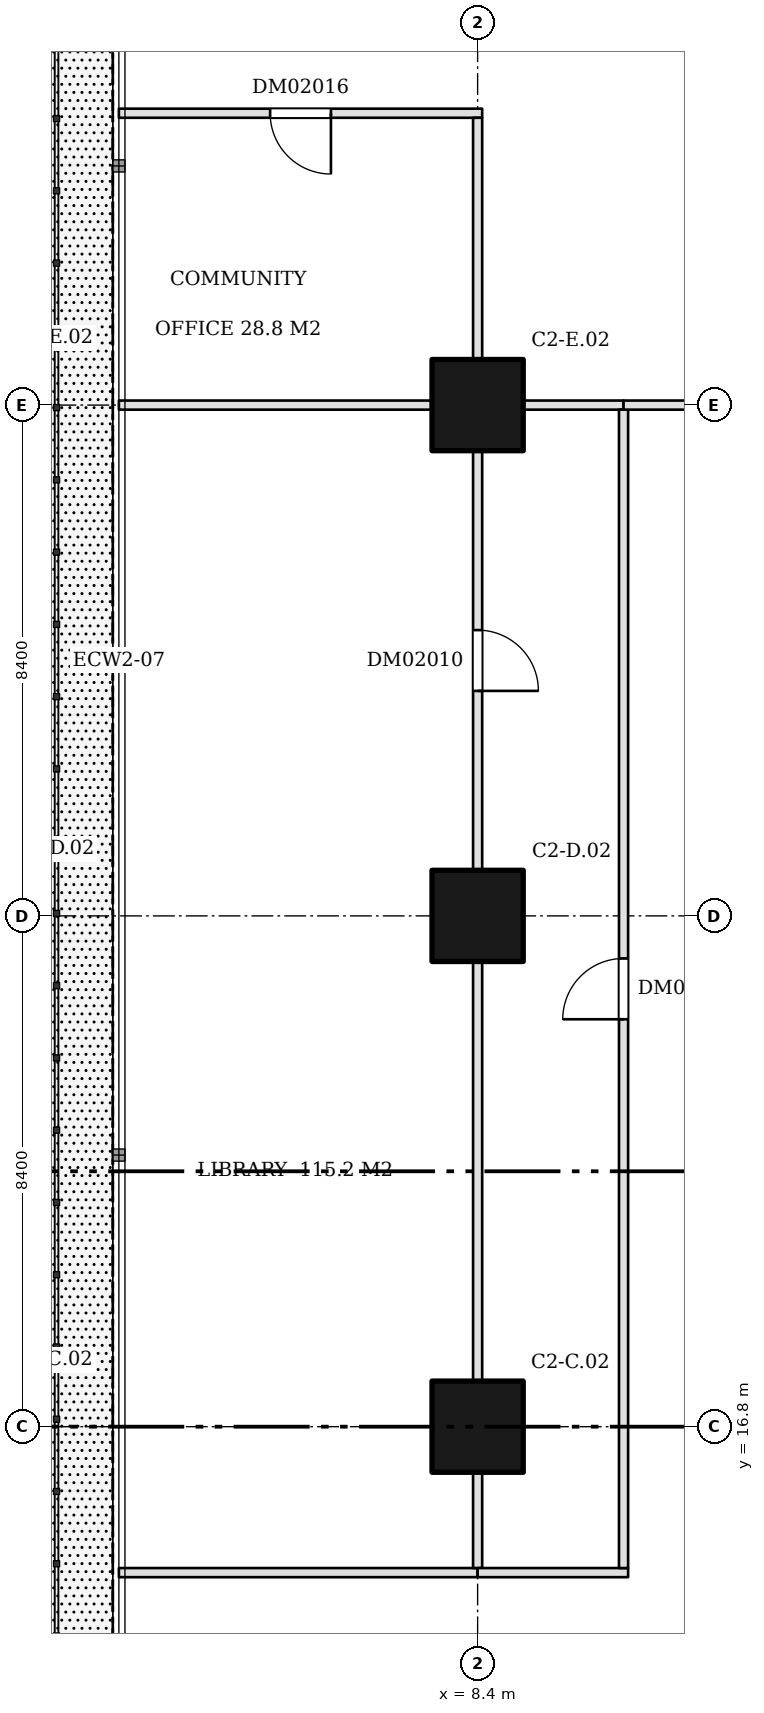
"""IFC4 building model, lengths in metres.
Left out: names, types, materials, properties, quantities, classifications, styles, units other than length and angle.
Written with IfcOpenShell. Run it as: python <this file> out.ifc"""

import sys

from ifc_helpers import new_model, si_unit, direction, frame, frame_2d, origin, origin_2d, place, context, subcontext, project, spatial, rectangle, extrude, element, fill, save


model = new_model("IFC4")
c1 = context("Model", 3, precision=1e-05, world=origin(), true_north=direction((0.0, 1.0)))
c2 = subcontext(c1, "Body", "Model", "MODEL_VIEW")
j1 = project(units=[si_unit("LENGTHUNIT", "METRE"), si_unit("PLANEANGLEUNIT", "RADIAN")], contexts=[c1])
p1 = place(None, origin())
s1 = spatial("IfcSite", under=j1, at=p1, CompositionType="ELEMENT")
p2 = place(p1, origin())
s2 = spatial("IfcBuilding", under=s1, at=p2, CompositionType="ELEMENT")
p3 = place(p2, frame((0.0, 0.0, 14.4)))
s3 = spatial("IfcBuildingStorey", under=s2, at=p3, CompositionType="ELEMENT", Elevation=14.4)
for number, where, z_axis, x_axis in (
    (1, (8.4, 16.8, 0.0), (0.0, 0.0, 1.0), (1.0, 0.0, 0.0)),
    (2, (8.4, 25.2, 0.0), (0.0, 0.0, 1.0), (1.0, 0.0, 0.0)),
    (3, (8.4, 33.6, 0.0), (0.0, 0.0, 1.0), (1.0, 0.0, 0.0)),
):
    element("IfcColumn", number, at=place(p3, frame(where, z_axis=z_axis, x_axis=x_axis)), inside=s3, PredefinedType="COLUMN", context=c2, shape_type="SweptSolid", body=[
        extrude(rectangle(XDim=1.5, YDim=1.5, at=origin_2d()), origin(), (0.0, 0.0, 1.0), 5.1),
    ])
p4 = place(p3, frame((2.5, 14.4, 0.0), z_axis=(0.0, 0.0, 1.0), x_axis=(1.0, 0.0, 0.0)))
e4 = element("IfcWall", 4, at=p4, inside=s3, PredefinedType="PARTITIONING", context=c2, shape_type="SweptSolid", body=[
    extrude(rectangle(XDim=5.9, YDim=0.15, at=frame_2d((2.95, 0.0))), origin(), (0.0, 0.0, 1.0), 5.1),
])
p5 = place(p3, frame((2.5, 33.6, 0.0), z_axis=(0.0, 0.0, 1.0), x_axis=(1.0, 0.0, 0.0)))
e5 = element("IfcWall", 5, at=p5, inside=s3, PredefinedType="PARTITIONING", context=c2, shape_type="SweptSolid", body=[
    extrude(rectangle(XDim=5.15, YDim=0.15, at=frame_2d((2.575, 0.0))), origin(), (0.0, 0.0, 1.0), 5.1),
])
p6 = place(p3, frame((2.5, 38.4, 0.0), z_axis=(0.0, 0.0, 1.0), x_axis=(1.0, 0.0, 0.0)))
e6 = element("IfcWall", 6, at=p6, inside=s3, PredefinedType="PARTITIONING", context=c2, shape_type="SweptSolid", body=[
    extrude(rectangle(XDim=5.975, YDim=0.15, at=frame_2d((2.988, 0.0))), origin(), (0.0, 0.0, 1.0), 5.1),
])
p7 = place(p6, frame((2.488, 0.0, 0.0)))
e7 = element("IfcOpeningElement", 7, at=p7, cuts=e6, PredefinedType="OPENING", context=c2, shape_type="SweptSolid", body=[
    extrude(rectangle(XDim=1.0, YDim=2.1, at=frame_2d((0.5, 1.05))), frame((0.0, 0.085, 0.0), z_axis=(0.0, -1.0, 0.0), x_axis=(1.0, 0.0, 0.0)), (0.0, 0.0, 1.0), 0.17),
])
p8 = place(p3, frame((8.4, 14.475, 0.0), z_axis=(0.0, 0.0, 1.0), x_axis=(0.0, 1.0, 0.0)))
e8 = element("IfcWall", 8, at=p8, inside=s3, PredefinedType="PARTITIONING", context=c2, shape_type="SweptSolid", body=[
    extrude(rectangle(XDim=1.575, YDim=0.15, at=frame_2d((0.788, 0.0))), origin(), (0.0, 0.0, 1.0), 5.1),
])
p9 = place(p3, frame((8.4, 17.55, 0.0), z_axis=(0.0, 0.0, 1.0), x_axis=(0.0, 1.0, 0.0)))
e9 = element("IfcWall", 9, at=p9, inside=s3, PredefinedType="PARTITIONING", context=c2, shape_type="SweptSolid", body=[
    extrude(rectangle(XDim=6.9, YDim=0.15, at=frame_2d((3.45, 0.0))), origin(), (0.0, 0.0, 1.0), 5.1),
])
p10 = place(p3, frame((8.4, 25.95, 0.0), z_axis=(0.0, 0.0, 1.0), x_axis=(0.0, 1.0, 0.0)))
e10 = element("IfcWall", 10, at=p10, inside=s3, PredefinedType="PARTITIONING", context=c2, shape_type="SweptSolid", body=[
    extrude(rectangle(XDim=6.9, YDim=0.15, at=frame_2d((3.45, 0.0))), origin(), (0.0, 0.0, 1.0), 5.1),
])
p11 = place(p10, frame((2.95, 0.0, 0.0)))
e11 = element("IfcOpeningElement", 11, at=p11, cuts=e10, PredefinedType="OPENING", context=c2, shape_type="SweptSolid", body=[
    extrude(rectangle(XDim=1.0, YDim=2.1, at=frame_2d((0.5, 1.05))), frame((0.0, 0.085, 0.0), z_axis=(0.0, -1.0, 0.0), x_axis=(1.0, 0.0, 0.0)), (0.0, 0.0, 1.0), 0.17),
])
p12 = place(p3, frame((8.4, 14.4, 0.0), z_axis=(0.0, 0.0, 1.0), x_axis=(1.0, 0.0, 0.0)))
e12 = element("IfcWall", 12, at=p12, inside=s3, PredefinedType="PARTITIONING", context=c2, shape_type="SweptSolid", body=[
    extrude(rectangle(XDim=2.475, YDim=0.15, at=frame_2d((1.238, 0.0))), origin(), (0.0, 0.0, 1.0), 5.1),
])
p13 = place(p3, frame((8.4, 34.35, 0.0), z_axis=(0.0, 0.0, 1.0), x_axis=(0.0, 1.0, 0.0)))
e13 = element("IfcWall", 13, at=p13, inside=s3, PredefinedType="PARTITIONING", context=c2, shape_type="SweptSolid", body=[
    extrude(rectangle(XDim=3.975, YDim=0.15, at=frame_2d((1.987, 0.0))), origin(), (0.0, 0.0, 1.0), 5.1),
])
p14 = place(p3, frame((9.15, 33.6, 0.0), z_axis=(0.0, 0.0, 1.0), x_axis=(1.0, 0.0, 0.0)))
e14 = element("IfcWall", 14, at=p14, inside=s3, PredefinedType="PARTITIONING", context=c2, shape_type="SweptSolid", body=[
    extrude(rectangle(XDim=1.65, YDim=0.15, at=frame_2d((0.825, 0.0))), origin(), (0.0, 0.0, 1.0), 5.1),
])
p15 = place(p3, frame((10.8, 14.475, 0.0), z_axis=(0.0, 0.0, 1.0), x_axis=(0.0, 1.0, 0.0)))
e15 = element("IfcWall", 15, at=p15, inside=s3, PredefinedType="PARTITIONING", context=c2, shape_type="SweptSolid", body=[
    extrude(rectangle(XDim=19.05, YDim=0.15, at=frame_2d((9.525, 0.0))), origin(), (0.0, 0.0, 1.0), 5.1),
])
p16 = place(p15, frame((9.025, 0.0, 0.0)))
e16 = element("IfcOpeningElement", 16, at=p16, cuts=e15, PredefinedType="OPENING", context=c2, shape_type="SweptSolid", body=[
    extrude(rectangle(XDim=1.0, YDim=2.1, at=frame_2d((0.5, 1.05))), frame((0.0, 0.085, 0.0), z_axis=(0.0, -1.0, 0.0), x_axis=(1.0, 0.0, 0.0)), (0.0, 0.0, 1.0), 0.17),
])
p17 = place(p3, frame((10.8, 33.6, 0.0), z_axis=(0.0, 0.0, 1.0), x_axis=(1.0, 0.0, 0.0)))
e17 = element("IfcWall", 17, at=p17, inside=s3, PredefinedType="PARTITIONING", context=c2, shape_type="SweptSolid", body=[
    extrude(rectangle(XDim=5.25, YDim=0.15, at=frame_2d((2.625, 0.0))), origin(), (0.0, 0.0, 1.0), 5.1),
])
p18 = place(p11, frame((1.0, 0.0, 0.0), z_axis=(0.0, 0.0, 1.0), x_axis=(-1.0, 0.0, 0.0)))
e18 = element("IfcDoor", 18, at=p18, inside=s3, OperationType="SINGLE_SWING_RIGHT", PredefinedType="DOOR", context=c2, shape_type="SweptSolid", body=[
    extrude(rectangle(XDim=1.0, YDim=2.1, at=frame_2d((0.5, 1.05))), frame((0.0, 0.025, 0.0), z_axis=(0.0, -1.0, 0.0), x_axis=(1.0, 0.0, 0.0)), (0.0, 0.0, 1.0), 0.05),
])
fill(e11, e18)
p19 = place(p16, origin())
e19 = element("IfcDoor", 19, at=p19, inside=s3, OperationType="SINGLE_SWING_LEFT", PredefinedType="DOOR", context=c2, shape_type="SweptSolid", body=[
    extrude(rectangle(XDim=1.0, YDim=2.1, at=frame_2d((0.5, 1.05))), frame((0.0, 0.025, 0.0), z_axis=(0.0, -1.0, 0.0), x_axis=(1.0, 0.0, 0.0)), (0.0, 0.0, 1.0), 0.05),
])
fill(e16, e19)
p20 = place(p7, frame((1.0, 0.0, 0.0), z_axis=(0.0, 0.0, 1.0), x_axis=(-1.0, 0.0, 0.0)))
e20 = element("IfcDoor", 20, at=p20, inside=s3, OperationType="SINGLE_SWING_LEFT", PredefinedType="DOOR", context=c2, shape_type="SweptSolid", body=[
    extrude(rectangle(XDim=1.0, YDim=2.1, at=frame_2d((0.5, 1.05))), frame((0.0, 0.025, 0.0), z_axis=(0.0, -1.0, 0.0), x_axis=(1.0, 0.0, 0.0)), (0.0, 0.0, 1.0), 0.05),
])
fill(e7, e20)
save(model, sys.argv[1])
